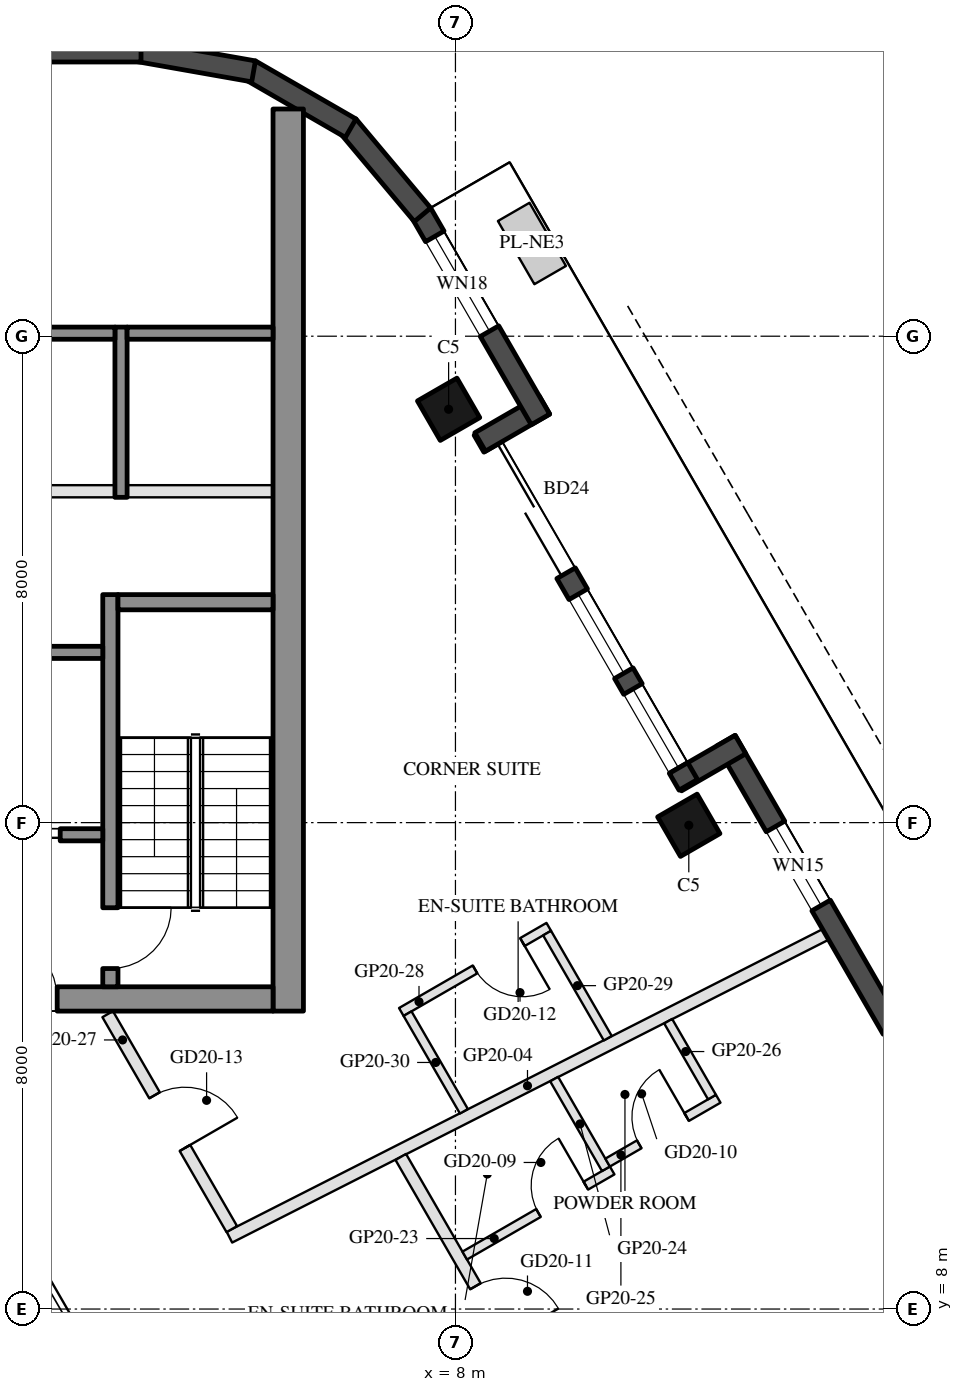
"""IFC4 building model, lengths in metres.
Left out: names, types, materials, properties, quantities, classifications, styles, units other than length and angle.
Written with IfcOpenShell. Run it as: python <this file> out.ifc"""

import sys

from ifc_helpers import new_model, si_unit, direction, frame, frame_2d, origin, origin_2d, place, context, subcontext, project, spatial, rectangle, hollow_rectangle, extrude, element, fill, save


model = new_model("IFC4")
c1 = context("Model", 3, precision=1e-05, world=origin(), true_north=direction((0.0, 1.0)))
c2 = subcontext(c1, "Body", "Model", "MODEL_VIEW")
j1 = project(units=[si_unit("LENGTHUNIT", "METRE"), si_unit("PLANEANGLEUNIT", "RADIAN")], contexts=[c1])
p1 = place(None, origin())
s1 = spatial("IfcSite", under=j1, at=p1, CompositionType="ELEMENT")
p2 = place(p1, origin())
s2 = spatial("IfcBuilding", under=s1, at=p2, CompositionType="ELEMENT")
p3 = place(p2, frame((0.0, 0.0, 213.2)))
s3 = spatial("IfcBuildingStorey", under=s2, at=p3, CompositionType="ELEMENT", Elevation=213.2)
for number, where, z_axis, x_axis in (
    (1, (11.838, 15.957, 0.0), (0.0, 0.0, 1.0), (-0.5, 0.866, 0.0)),
    (2, (7.888, 22.798, 0.0), (0.0, 0.0, 1.0), (-0.5, 0.866, 0.0)),
):
    element("IfcColumn", number, at=place(p3, frame(where, z_axis=z_axis, x_axis=x_axis)), inside=s3, PredefinedType="COLUMN", context=c2, shape_type="SweptSolid", body=[
        extrude(hollow_rectangle(XDim=0.75, YDim=0.75, WallThickness=0.035, at=origin_2d()), origin(), (0.0, 0.0, 1.0), 3.7),
    ])
p4 = place(p3, frame((17.299, 8.948, 0.0), z_axis=(0.0, 0.0, 1.0), x_axis=(-0.500010041276, 0.866019606374, 0.0)))
e3 = element("IfcWall", 3, at=p4, inside=s3, PredefinedType="SOLIDWALL", context=c2, shape_type="SweptSolid", body=[
    extrude(rectangle(XDim=9.7, YDim=0.35, at=frame_2d((4.85, 0.0))), origin(), (0.0, 0.0, 1.0), 3.55),
])
p5 = place(p4, frame((1.625, 0.0, 0.3)))
e4 = element("IfcOpeningElement", 4, at=p5, cuts=e3, PredefinedType="OPENING", context=c2, shape_type="SweptSolid", body=[
    extrude(rectangle(XDim=2.6, YDim=2.65, at=frame_2d((1.3, 1.325))), frame((0.0, 0.185, 0.0), z_axis=(0.0, -1.0, 0.0), x_axis=(1.0, 0.0, 0.0)), (0.0, 0.0, 1.0), 0.37),
])
p6 = place(p4, frame((6.57, 0.0, 0.3)))
e5 = element("IfcOpeningElement", 5, at=p6, cuts=e3, PredefinedType="OPENING", context=c2, shape_type="SweptSolid", body=[
    extrude(rectangle(XDim=1.5, YDim=2.65, at=frame_2d((0.75, 1.325))), frame((0.0, 0.185, 0.0), z_axis=(0.0, -1.0, 0.0), x_axis=(1.0, 0.0, 0.0)), (0.0, 0.0, 1.0), 0.37),
])
p7 = place(p3, frame((12.688, 17.284, 0.0), z_axis=(0.0, 0.0, 1.0), x_axis=(-0.865955602162, -0.500120880472, 0.0)))
e6 = element("IfcWall", 6, at=p7, inside=s3, PredefinedType="SOLIDWALL", context=c2, shape_type="SweptSolid", body=[
    extrude(rectangle(XDim=1.22, YDim=0.35, at=frame_2d((0.61, 0.0))), origin(), (0.0, 0.0, 1.0), 3.55),
])
p8 = place(p3, frame((11.829, 16.621, 0.0), z_axis=(0.0, 0.0, 1.0), x_axis=(-0.500003597184, 0.866023326939, 0.0)))
e7 = element("IfcWall", 7, at=p8, inside=s3, PredefinedType="SOLIDWALL", context=c2, shape_type="SweptSolid", body=[
    extrude(rectangle(XDim=6.74, YDim=0.35, at=frame_2d((3.37, 0.0))), origin(), (0.0, 0.0, 1.0), 3.55),
])
p9 = place(p8, frame((4.02, 0.0, 0.0)))
e8 = element("IfcOpeningElement", 8, at=p9, cuts=e7, PredefinedType="OPENING", context=c2, shape_type="SweptSolid", body=[
    extrude(rectangle(XDim=2.4, YDim=2.4, at=frame_2d((1.2, 1.2))), frame((0.0, 0.185, 0.0), z_axis=(0.0, -1.0, 0.0), x_axis=(1.0, 0.0, 0.0)), (0.0, 0.0, 1.0), 0.37),
])
p10 = place(p8, frame((0.32, 0.0, 0.3)))
e9 = element("IfcOpeningElement", 9, at=p10, cuts=e7, PredefinedType="OPENING", context=c2, shape_type="SweptSolid", body=[
    extrude(rectangle(XDim=1.5, YDim=2.65, at=frame_2d((0.75, 1.325))), frame((0.0, 0.185, 0.0), z_axis=(0.0, -1.0, 0.0), x_axis=(1.0, 0.0, 0.0)), (0.0, 0.0, 1.0), 0.37),
])
p11 = place(p8, frame((2.12, 0.0, 0.3)))
e10 = element("IfcOpeningElement", 10, at=p11, cuts=e7, PredefinedType="OPENING", context=c2, shape_type="SweptSolid", body=[
    extrude(rectangle(XDim=1.5, YDim=2.65, at=frame_2d((0.75, 1.325))), frame((0.0, 0.185, 0.0), z_axis=(0.0, -1.0, 0.0), x_axis=(1.0, 0.0, 0.0)), (0.0, 0.0, 1.0), 0.37),
])
p12 = place(p3, frame((8.406, 22.26, 0.0), z_axis=(0.0, 0.0, 1.0), x_axis=(0.865955602162, 0.500120880472, 0.0)))
e11 = element("IfcWall", 11, at=p12, inside=s3, PredefinedType="SOLIDWALL", context=c2, shape_type="SweptSolid", body=[
    extrude(rectangle(XDim=1.22, YDim=0.35, at=frame_2d((0.61, 0.0))), origin(), (0.0, 0.0, 1.0), 3.55),
])
p13 = place(p3, frame((9.398, 22.631, 0.0), z_axis=(0.0, 0.0, 1.0), x_axis=(-0.499954521343, 0.866051659307, 0.0)))
e12 = element("IfcWall", 12, at=p13, inside=s3, PredefinedType="SOLIDWALL", context=c2, shape_type="SweptSolid", body=[
    extrude(rectangle(XDim=3.916, YDim=0.35, at=frame_2d((1.958, 0.0))), origin(), (0.0, 0.0, 1.0), 3.55),
])
p14 = place(p13, frame((1.676, 0.0, 0.3)))
e13 = element("IfcOpeningElement", 13, at=p14, cuts=e12, PredefinedType="OPENING", context=c2, shape_type="SweptSolid", body=[
    extrude(rectangle(XDim=1.8, YDim=2.65, at=frame_2d((0.9, 1.325))), frame((0.0, 0.185, 0.0), z_axis=(0.0, -1.0, 0.0), x_axis=(1.0, 0.0, 0.0)), (0.0, 0.0, 1.0), 0.37),
])
p15 = place(p3, frame((7.458, 25.998, 0.0), z_axis=(0.0, 0.0, 1.0), x_axis=(-0.642808304945, 0.766027077259, 0.0)))
e14 = element("IfcWall", 14, at=p15, inside=s3, PredefinedType="SOLIDWALL", context=c2, shape_type="SweptSolid", body=[
    extrude(rectangle(XDim=1.91, YDim=0.35, at=frame_2d((0.955, 0.0))), origin(), (0.0, 0.0, 1.0), 3.55),
])
for number, where, z_axis, x_axis in (
    (15, (6.277, 27.422, 0.0), (0.0, 0.0, 1.0), (-0.866, 0.5, 0.0)),
    (16, (4.68, 28.356, 0.0), (0.0, 0.0, 1.0), (-0.985, 0.174, 0.0)),
):
    element("IfcWall", number, at=place(p3, frame(where, z_axis=z_axis, x_axis=x_axis)), inside=s3, PredefinedType="SOLIDWALL", context=c2, shape_type="SweptSolid", body=[
        extrude(rectangle(XDim=1.91, YDim=0.35, at=frame_2d((0.955, 0.0))), origin(), (0.0, 0.0, 1.0), 3.55),
    ])
p16 = place(p3, frame((2.829, 28.685, 0.0), z_axis=(0.0, 0.0, 1.0), x_axis=(-1.0, 0.0, 0.0)))
e17 = element("IfcWall", 17, at=p16, inside=s3, PredefinedType="SOLIDWALL", context=c2, shape_type="SweptSolid", body=[
    extrude(rectangle(XDim=5.658, YDim=0.35, at=frame_2d((2.829, 0.0))), origin(), (0.0, 0.0, 1.0), 3.55),
])
p17 = place(p3, frame((5.25, 12.9, 0.0), z_axis=(0.0, 0.0, 1.0), x_axis=(0.0, 1.0, 0.0)))
e18 = element("IfcWall", 18, at=p17, inside=s3, PredefinedType="SHEAR", context=c2, shape_type="SweptSolid", body=[
    extrude(rectangle(XDim=14.837, YDim=0.5, at=frame_2d((7.418, 0.0))), origin(), (0.0, 0.0, 1.0), 3.5),
])
p18 = place(p3, frame((5.0, 13.1, 0.0), z_axis=(0.0, 0.0, 1.0), x_axis=(-1.0, 0.0, 0.0)))
e19 = element("IfcWall", 19, at=p18, inside=s3, PredefinedType="SHEAR", context=c2, shape_type="SweptSolid", body=[
    extrude(rectangle(XDim=10.0, YDim=0.4, at=frame_2d((5.0, 0.0))), origin(), (0.0, 0.0, 1.0), 3.5),
])
p19 = place(p18, frame((3.55, 0.0, 0.0)))
e20 = element("IfcOpeningElement", 20, at=p19, cuts=e19, PredefinedType="OPENING", context=c2, shape_type="SweptSolid", body=[
    extrude(rectangle(XDim=1.1, YDim=2.1, at=frame_2d((0.55, 1.05))), frame((0.0, 0.21, 0.0), z_axis=(0.0, -1.0, 0.0), x_axis=(1.0, 0.0, 0.0)), (0.0, 0.0, 1.0), 0.42),
])
p20 = place(p18, frame((5.85, 0.0, 0.0)))
e21 = element("IfcOpeningElement", 21, at=p20, cuts=e19, PredefinedType="OPENING", context=c2, shape_type="SweptSolid", body=[
    extrude(rectangle(XDim=1.4, YDim=2.1, at=frame_2d((0.7, 1.05))), frame((0.0, 0.21, 0.0), z_axis=(0.0, -1.0, 0.0), x_axis=(1.0, 0.0, 0.0)), (0.0, 0.0, 1.0), 0.42),
])
p21 = place(p3, frame((2.325, 13.3, 0.0), z_axis=(0.0, 0.0, 1.0), x_axis=(0.0, 1.0, 0.0)))
e22 = element("IfcWall", 22, at=p21, inside=s3, PredefinedType="SHEAR", context=c2, shape_type="SweptSolid", body=[
    extrude(rectangle(XDim=6.45, YDim=0.25, at=frame_2d((3.225, 0.0))), origin(), (0.0, 0.0, 1.0), 3.5),
])
p22 = place(p21, frame((0.3, 0.0, 0.0)))
e23 = element("IfcOpeningElement", 23, at=p22, cuts=e22, PredefinedType="OPENING", context=c2, shape_type="SweptSolid", body=[
    extrude(rectangle(XDim=1.0, YDim=2.1, at=frame_2d((0.5, 1.05))), frame((0.0, 0.135, 0.0), z_axis=(0.0, -1.0, 0.0), x_axis=(1.0, 0.0, 0.0)), (0.0, 0.0, 1.0), 0.27),
])
p23 = place(p3, frame((5.0, 19.625, 0.0), z_axis=(0.0, 0.0, 1.0), x_axis=(-1.0, 0.0, 0.0)))
e24 = element("IfcWall", 24, at=p23, inside=s3, PredefinedType="SHEAR", context=c2, shape_type="SweptSolid", body=[
    extrude(rectangle(XDim=2.55, YDim=0.25, at=frame_2d((1.275, 0.0))), origin(), (0.0, 0.0, 1.0), 3.5),
])
p24 = place(p3, frame((2.2, 18.8, 0.0), z_axis=(0.0, 0.0, 1.0), x_axis=(-1.0, 0.0, 0.0)))
e25 = element("IfcWall", 25, at=p24, inside=s3, PredefinedType="SHEAR", context=c2, shape_type="SweptSolid", body=[
    extrude(rectangle(XDim=2.8, YDim=0.2, at=frame_2d((1.4, 0.0))), origin(), (0.0, 0.0, 1.0), 3.5),
])
p25 = place(p3, frame((2.2, 15.8, 0.0), z_axis=(0.0, 0.0, 1.0), x_axis=(-1.0, 0.0, 0.0)))
e26 = element("IfcWall", 26, at=p25, inside=s3, PredefinedType="SHEAR", context=c2, shape_type="SweptSolid", body=[
    extrude(rectangle(XDim=2.8, YDim=0.2, at=frame_2d((1.4, 0.0))), origin(), (0.0, 0.0, 1.0), 3.5),
])
p26 = place(p25, frame((0.7, 0.0, 0.0)))
e27 = element("IfcOpeningElement", 27, at=p26, cuts=e26, PredefinedType="OPENING", context=c2, shape_type="SweptSolid", body=[
    extrude(rectangle(XDim=1.2, YDim=2.1, at=frame_2d((0.6, 1.05))), frame((0.0, 0.11, 0.0), z_axis=(0.0, -1.0, 0.0), x_axis=(1.0, 0.0, 0.0)), (0.0, 0.0, 1.0), 0.22),
])
p27 = place(p3, frame((2.5, 21.35, 0.0), z_axis=(0.0, 0.0, 1.0), x_axis=(0.0, 1.0, 0.0)))
e28 = element("IfcWall", 28, at=p27, inside=s3, PredefinedType="SHEAR", context=c2, shape_type="SweptSolid", body=[
    extrude(rectangle(XDim=2.8, YDim=0.2, at=frame_2d((1.4, 0.0))), origin(), (0.0, 0.0, 1.0), 3.5),
])
p28 = place(p3, frame((5.0, 24.05, 0.0), z_axis=(0.0, 0.0, 1.0), x_axis=(-1.0, 0.0, 0.0)))
e29 = element("IfcWall", 29, at=p28, inside=s3, PredefinedType="SHEAR", context=c2, shape_type="SweptSolid", body=[
    extrude(rectangle(XDim=2.4, YDim=0.2, at=frame_2d((1.2, 0.0))), origin(), (0.0, 0.0, 1.0), 3.5),
])
p29 = place(p3, frame((2.4, 24.05, 0.0), z_axis=(0.0, 0.0, 1.0), x_axis=(-1.0, 0.0, 0.0)))
e30 = element("IfcWall", 30, at=p29, inside=s3, PredefinedType="SHEAR", context=c2, shape_type="SweptSolid", body=[
    extrude(rectangle(XDim=2.8, YDim=0.2, at=frame_2d((1.4, 0.0))), origin(), (0.0, 0.0, 1.0), 3.5),
])
p30 = place(p3, frame((5.0, 21.45, 0.0), z_axis=(0.0, 0.0, 1.0), x_axis=(-1.0, 0.0, 0.0)))
e31 = element("IfcWall", 31, at=p30, inside=s3, PredefinedType="PARTITIONING", context=c2, shape_type="SweptSolid", body=[
    extrude(rectangle(XDim=2.4, YDim=0.2, at=frame_2d((1.2, 0.0))), origin(), (0.0, 0.0, 1.0), 3.5),
])
p31 = place(p3, frame((2.4, 21.45, 0.0), z_axis=(0.0, 0.0, 1.0), x_axis=(-1.0, 0.0, 0.0)))
e32 = element("IfcWall", 32, at=p31, inside=s3, PredefinedType="PARTITIONING", context=c2, shape_type="SweptSolid", body=[
    extrude(rectangle(XDim=2.8, YDim=0.2, at=frame_2d((1.4, 0.0))), origin(), (0.0, 0.0, 1.0), 3.5),
])
p32 = place(p3, frame((14.087, 14.161, 0.0), z_axis=(0.0, 0.0, 1.0), x_axis=(-0.891639053189, -0.452746947895, 0.0)))
e33 = element("IfcWall", 33, at=p32, inside=s3, PredefinedType="PARTITIONING", context=c2, shape_type="SweptSolid", body=[
    extrude(rectangle(XDim=10.996, YDim=0.2, at=frame_2d((5.498, 0.0))), origin(), (0.0, 0.0, 1.0), 3.06),
])
p33 = place(p3, frame((7.101, 10.501, 0.0), z_axis=(0.0, 0.0, 1.0), x_axis=(0.500001329633, -0.866024636119, 0.0)))
e34 = element("IfcWall", 34, at=p33, inside=s3, PredefinedType="PARTITIONING", context=c2, shape_type="SweptSolid", body=[
    extrude(rectangle(XDim=11.544, YDim=0.2, at=frame_2d((5.772, 0.0))), origin(), (0.0, 0.0, 1.0), 2.95),
])
p34 = place(p33, frame((2.455, 0.0, 0.0)))
e35 = element("IfcOpeningElement", 35, at=p34, cuts=e34, PredefinedType="OPENING", context=c2, shape_type="SweptSolid", body=[
    extrude(rectangle(XDim=1.0, YDim=2.1, at=frame_2d((0.5, 1.05))), frame((0.0, 0.11, 0.0), z_axis=(0.0, -1.0, 0.0), x_axis=(1.0, 0.0, 0.0)), (0.0, 0.0, 1.0), 0.22),
])
p35 = place(p3, frame((8.153, 8.879, 0.0), z_axis=(0.0, 0.0, 1.0), x_axis=(0.866034573852, 0.49998411664, 0.0)))
e36 = element("IfcWall", 36, at=p35, inside=s3, PredefinedType="PARTITIONING", context=c2, shape_type="SweptSolid", body=[
    extrude(rectangle(XDim=2.8, YDim=0.15, at=frame_2d((1.4, 0.0))), origin(), (0.0, 0.0, 1.0), 3.55),
])
p36 = place(p35, frame((1.4, 0.0, 0.0)))
e37 = element("IfcOpeningElement", 37, at=p36, cuts=e36, PredefinedType="OPENING", context=c2, shape_type="SweptSolid", body=[
    extrude(rectangle(XDim=0.9, YDim=2.1, at=frame_2d((0.45, 1.05))), frame((0.0, 0.085, 0.0), z_axis=(0.0, -1.0, 0.0), x_axis=(1.0, 0.0, 0.0)), (0.0, 0.0, 1.0), 0.17),
])
p37 = place(p3, frame((10.475, 10.307, 0.0), z_axis=(0.0, 0.0, 1.0), x_axis=(-0.500069835465, 0.865985080505, 0.0)))
e38 = element("IfcWall", 38, at=p37, inside=s3, PredefinedType="PARTITIONING", context=c2, shape_type="SweptSolid", body=[
    extrude(rectangle(XDim=1.703, YDim=0.15, at=frame_2d((0.852, 0.0))), origin(), (0.0, 0.0, 1.0), 2.95),
])
p38 = place(p3, frame((10.503, 10.409, 0.0), z_axis=(0.0, 0.0, 1.0), x_axis=(0.866009402589, 0.500027713859, 0.0)))
e39 = element("IfcWall", 39, at=p38, inside=s3, PredefinedType="PARTITIONING", context=c2, shape_type="SweptSolid", body=[
    extrude(rectangle(XDim=2.1, YDim=0.15, at=frame_2d((1.05, 0.0))), origin(), (0.0, 0.0, 1.0), 3.55),
])
p39 = place(p38, frame((0.6, 0.0, 0.0)))
e40 = element("IfcOpeningElement", 40, at=p39, cuts=e39, PredefinedType="OPENING", context=c2, shape_type="SweptSolid", body=[
    extrude(rectangle(XDim=0.9, YDim=2.1, at=frame_2d((0.45, 1.05))), frame((0.0, 0.085, 0.0), z_axis=(0.0, -1.0, 0.0), x_axis=(1.0, 0.0, 0.0)), (0.0, 0.0, 1.0), 0.17),
])
p40 = place(p3, frame((12.219, 11.486, 0.0), z_axis=(0.0, 0.0, 1.0), x_axis=(-0.500074377092, 0.865982457891, 0.0)))
e41 = element("IfcWall", 41, at=p40, inside=s3, PredefinedType="PARTITIONING", context=c2, shape_type="SweptSolid", body=[
    extrude(rectangle(XDim=1.441, YDim=0.15, at=frame_2d((0.721, 0.0))), origin(), (0.0, 0.0, 1.0), 2.95),
])
p41 = place(p3, frame((2.281, 12.85, 0.0), z_axis=(0.0, 0.0, 1.0), x_axis=(0.500010586081, -0.866019291821, 0.0)))
e42 = element("IfcWall", 42, at=p41, inside=s3, PredefinedType="PARTITIONING", context=c2, shape_type="SweptSolid", body=[
    extrude(rectangle(XDim=4.083, YDim=0.2, at=frame_2d((2.042, 0.0))), origin(), (0.0, 0.0, 1.0), 2.95),
])
p42 = place(p41, frame((1.541, 0.0, 0.0)))
e43 = element("IfcOpeningElement", 43, at=p42, cuts=e42, PredefinedType="OPENING", context=c2, shape_type="SweptSolid", body=[
    extrude(rectangle(XDim=1.0, YDim=2.1, at=frame_2d((0.5, 1.05))), frame((0.0, 0.11, 0.0), z_axis=(0.0, -1.0, 0.0), x_axis=(1.0, 0.0, 0.0)), (0.0, 0.0, 1.0), 0.22),
])
p43 = place(p3, frame((9.534, 14.286, 0.0), z_axis=(0.0, 0.0, 1.0), x_axis=(-0.866034573852, -0.49998411664, 0.0)))
e44 = element("IfcWall", 44, at=p43, inside=s3, PredefinedType="PARTITIONING", context=c2, shape_type="SweptSolid", body=[
    extrude(rectangle(XDim=2.8, YDim=0.15, at=frame_2d((1.4, 0.0))), origin(), (0.0, 0.0, 1.0), 3.55),
])
p44 = place(p43, frame((0.5, 0.0, 0.0)))
e45 = element("IfcOpeningElement", 45, at=p44, cuts=e44, PredefinedType="OPENING", context=c2, shape_type="SweptSolid", body=[
    extrude(rectangle(XDim=0.9, YDim=2.1, at=frame_2d((0.45, 1.05))), frame((0.0, 0.085, 0.0), z_axis=(0.0, -1.0, 0.0), x_axis=(1.0, 0.0, 0.0)), (0.0, 0.0, 1.0), 0.17),
])
p45 = place(p3, frame((10.505, 12.454, 0.0), z_axis=(0.0, 0.0, 1.0), x_axis=(-0.499965889992, 0.866045096311, 0.0)))
e46 = element("IfcWall", 46, at=p45, inside=s3, PredefinedType="PARTITIONING", context=c2, shape_type="SweptSolid", body=[
    extrude(rectangle(XDim=1.997, YDim=0.15, at=frame_2d((0.999, 0.0))), origin(), (0.0, 0.0, 1.0), 3.55),
])
p46 = place(p3, frame((8.139, 11.253, 0.0), z_axis=(0.0, 0.0, 1.0), x_axis=(-0.4999770169, 0.866038672677, 0.0)))
e47 = element("IfcWall", 47, at=p46, inside=s3, PredefinedType="PARTITIONING", context=c2, shape_type="SweptSolid", body=[
    extrude(rectangle(XDim=1.854, YDim=0.15, at=frame_2d((0.927, 0.0))), origin(), (0.0, 0.0, 1.0), 3.55),
])
p47 = place(p6, origin())
e48 = element("IfcWindow", 48, at=p47, inside=s3, PartitioningType="SINGLE_PANEL", PredefinedType="WINDOW", context=c2, shape_type="SweptSolid", body=[
    extrude(rectangle(XDim=1.5, YDim=2.65, at=frame_2d((0.75, 1.325))), frame((0.0, 0.03, 0.0), z_axis=(0.0, -1.0, 0.0), x_axis=(1.0, 0.0, 0.0)), (0.0, 0.0, 1.0), 0.06),
])
fill(e5, e48)
p48 = place(p9, frame((2.4, 0.0, 0.0), z_axis=(0.0, 0.0, 1.0), x_axis=(-1.0, 0.0, 0.0)))
e49 = element("IfcDoor", 49, at=p48, inside=s3, OperationType="SLIDING_TO_LEFT", PredefinedType="DOOR", context=c2, shape_type="SweptSolid", body=[
    extrude(rectangle(XDim=2.4, YDim=2.4, at=frame_2d((1.2, 1.2))), frame((0.0, 0.025, 0.0), z_axis=(0.0, -1.0, 0.0), x_axis=(1.0, 0.0, 0.0)), (0.0, 0.0, 1.0), 0.05),
])
fill(e8, e49)
p49 = place(p10, origin())
e50 = element("IfcWindow", 50, at=p49, inside=s3, PartitioningType="SINGLE_PANEL", PredefinedType="WINDOW", context=c2, shape_type="SweptSolid", body=[
    extrude(rectangle(XDim=1.5, YDim=2.65, at=frame_2d((0.75, 1.325))), frame((0.0, 0.03, 0.0), z_axis=(0.0, -1.0, 0.0), x_axis=(1.0, 0.0, 0.0)), (0.0, 0.0, 1.0), 0.06),
])
fill(e9, e50)
p50 = place(p11, origin())
e51 = element("IfcWindow", 51, at=p50, inside=s3, PartitioningType="SINGLE_PANEL", PredefinedType="WINDOW", context=c2, shape_type="SweptSolid", body=[
    extrude(rectangle(XDim=1.5, YDim=2.65, at=frame_2d((0.75, 1.325))), frame((0.0, 0.03, 0.0), z_axis=(0.0, -1.0, 0.0), x_axis=(1.0, 0.0, 0.0)), (0.0, 0.0, 1.0), 0.06),
])
fill(e10, e51)
p51 = place(p14, origin())
e52 = element("IfcWindow", 52, at=p51, inside=s3, PartitioningType="SINGLE_PANEL", PredefinedType="WINDOW", context=c2, shape_type="SweptSolid", body=[
    extrude(rectangle(XDim=1.8, YDim=2.65, at=frame_2d((0.9, 1.325))), frame((0.0, 0.03, 0.0), z_axis=(0.0, -1.0, 0.0), x_axis=(1.0, 0.0, 0.0)), (0.0, 0.0, 1.0), 0.06),
])
fill(e13, e52)
p52 = place(p26, origin())
e53 = element("IfcDoor", 53, at=p52, inside=s3, OperationType="DOUBLE_DOOR_SLIDING", PredefinedType="DOOR", context=c2, shape_type="SweptSolid", body=[
    extrude(rectangle(XDim=1.2, YDim=2.1, at=frame_2d((0.6, 1.05))), frame((0.0, 0.025, 0.0), z_axis=(0.0, -1.0, 0.0), x_axis=(1.0, 0.0, 0.0)), (0.0, 0.0, 1.0), 0.05),
])
fill(e27, e53)
p53 = place(p19, frame((1.1, 0.0, 0.0), z_axis=(0.0, 0.0, 1.0), x_axis=(-1.0, 0.0, 0.0)))
e54 = element("IfcDoor", 54, at=p53, inside=s3, OperationType="SINGLE_SWING_LEFT", PredefinedType="DOOR", context=c2, shape_type="SweptSolid", body=[
    extrude(rectangle(XDim=1.1, YDim=2.1, at=frame_2d((0.55, 1.05))), frame((0.0, 0.025, 0.0), z_axis=(0.0, -1.0, 0.0), x_axis=(1.0, 0.0, 0.0)), (0.0, 0.0, 1.0), 0.05),
])
fill(e20, e54)
p54 = place(p22, frame((1.0, 0.0, 0.0), z_axis=(0.0, 0.0, 1.0), x_axis=(-1.0, 0.0, 0.0)))
e55 = element("IfcDoor", 55, at=p54, inside=s3, OperationType="SINGLE_SWING_LEFT", PredefinedType="DOOR", context=c2, shape_type="SweptSolid", body=[
    extrude(rectangle(XDim=1.0, YDim=2.1, at=frame_2d((0.5, 1.05))), frame((0.0, 0.025, 0.0), z_axis=(0.0, -1.0, 0.0), x_axis=(1.0, 0.0, 0.0)), (0.0, 0.0, 1.0), 0.05),
])
fill(e23, e55)
p55 = place(p36, origin())
e56 = element("IfcDoor", 56, at=p55, inside=s3, OperationType="SINGLE_SWING_RIGHT", PredefinedType="DOOR", context=c2, shape_type="SweptSolid", body=[
    extrude(rectangle(XDim=0.9, YDim=2.1, at=frame_2d((0.45, 1.05))), frame((0.0, 0.025, 0.0), z_axis=(0.0, -1.0, 0.0), x_axis=(1.0, 0.0, 0.0)), (0.0, 0.0, 1.0), 0.05),
])
fill(e37, e56)
p56 = place(p39, origin())
e57 = element("IfcDoor", 57, at=p56, inside=s3, OperationType="SINGLE_SWING_RIGHT", PredefinedType="DOOR", context=c2, shape_type="SweptSolid", body=[
    extrude(rectangle(XDim=0.9, YDim=2.1, at=frame_2d((0.45, 1.05))), frame((0.0, 0.025, 0.0), z_axis=(0.0, -1.0, 0.0), x_axis=(1.0, 0.0, 0.0)), (0.0, 0.0, 1.0), 0.05),
])
fill(e40, e57)
p57 = place(p34, origin())
e58 = element("IfcDoor", 58, at=p57, inside=s3, OperationType="SINGLE_SWING_RIGHT", PredefinedType="DOOR", context=c2, shape_type="SweptSolid", body=[
    extrude(rectangle(XDim=1.0, YDim=2.1, at=frame_2d((0.5, 1.05))), frame((0.0, 0.025, 0.0), z_axis=(0.0, -1.0, 0.0), x_axis=(1.0, 0.0, 0.0)), (0.0, 0.0, 1.0), 0.05),
])
fill(e35, e58)
p58 = place(p44, origin())
e59 = element("IfcDoor", 59, at=p58, inside=s3, OperationType="SINGLE_SWING_LEFT", PredefinedType="DOOR", context=c2, shape_type="SweptSolid", body=[
    extrude(rectangle(XDim=0.9, YDim=2.1, at=frame_2d((0.45, 1.05))), frame((0.0, 0.025, 0.0), z_axis=(0.0, -1.0, 0.0), x_axis=(1.0, 0.0, 0.0)), (0.0, 0.0, 1.0), 0.05),
])
fill(e45, e59)
p59 = place(p42, origin())
e60 = element("IfcDoor", 60, at=p59, inside=s3, OperationType="SINGLE_SWING_RIGHT", PredefinedType="DOOR", context=c2, shape_type="SweptSolid", body=[
    extrude(rectangle(XDim=1.0, YDim=2.1, at=frame_2d((0.5, 1.05))), frame((0.0, 0.025, 0.0), z_axis=(0.0, -1.0, 0.0), x_axis=(1.0, 0.0, 0.0)), (0.0, 0.0, 1.0), 0.05),
])
fill(e43, e60)
save(model, sys.argv[1])
